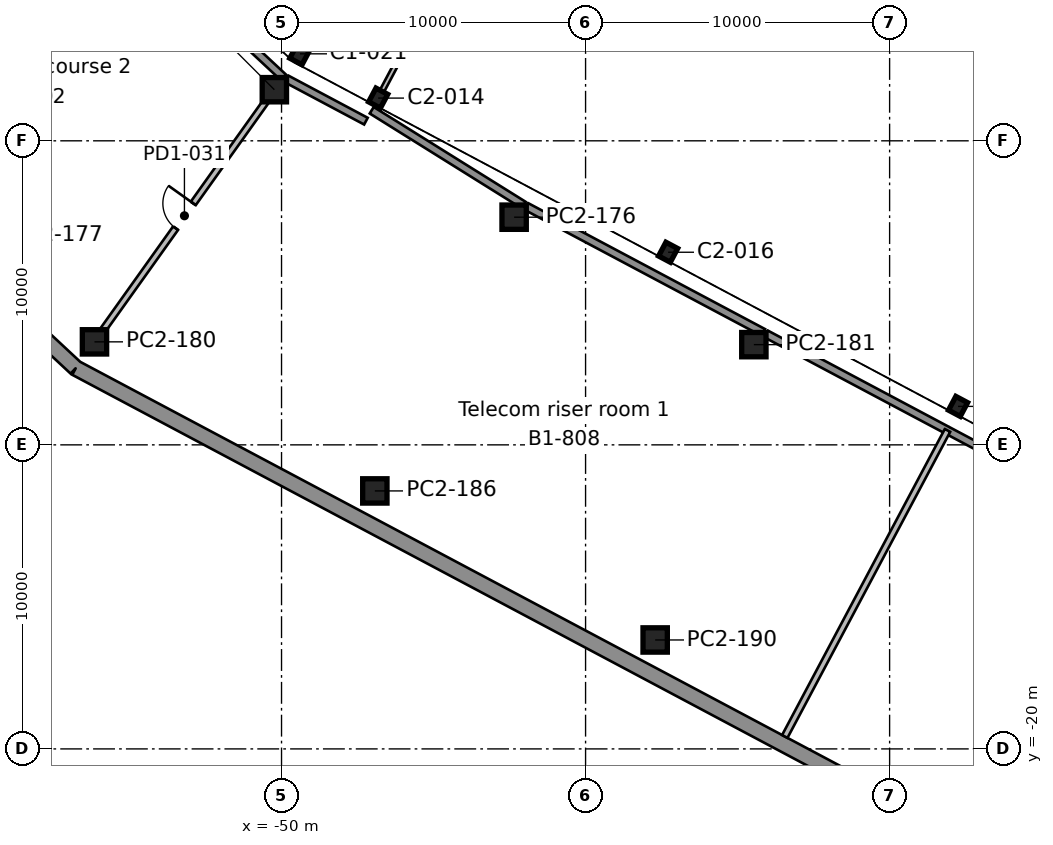
"""IFC4 building model, lengths in metres.
Left out: names, types, materials, properties, quantities, classifications, styles, units other than length and angle.
Written with IfcOpenShell. Run it as: python <this file> out.ifc"""

import sys

from ifc_helpers import new_model, si_unit, direction, frame, frame_2d, origin, origin_2d, place, context, subcontext, project, spatial, rectangle, i_section, extrude, element, fill, save


model = new_model("IFC4")
c1 = context("Model", 3, precision=1e-05, world=origin(), true_north=direction((0.0, 1.0)))
c2 = subcontext(c1, "Body", "Model", "MODEL_VIEW")
j1 = project(units=[si_unit("LENGTHUNIT", "METRE"), si_unit("PLANEANGLEUNIT", "RADIAN")], contexts=[c1])
p1 = place(None, origin())
s1 = spatial("IfcSite", under=j1, at=p1, CompositionType="ELEMENT")
p2 = place(p1, origin())
s2 = spatial("IfcBuilding", under=s1, at=p2, CompositionType="ELEMENT")
p3 = place(p2, frame((0.0, 0.0, -4.5)))
s3 = spatial("IfcBuildingStorey", under=s2, at=p3, CompositionType="ELEMENT", Elevation=-4.5)
for number, where, z_axis, x_axis in (
    (1, (-27.749, -8.735, 0.0), (0.0, 0.0, 1.0), (0.883, -0.469, 0.0)),
    (2, (-37.285, -3.665, 0.0), (0.0, 0.0, 1.0), (0.883, -0.469, 0.0)),
    (3, (-46.821, 1.405, 0.0), (0.0, 0.0, 1.0), (0.883, -0.469, 0.0)),
):
    element("IfcColumn", number, at=place(p3, frame(where, z_axis=z_axis, x_axis=x_axis)), inside=s3, PredefinedType="COLUMN", context=c2, shape_type="SweptSolid", body=[
        extrude(i_section(OverallWidth=0.437, OverallDepth=0.513, WebThickness=0.061, FlangeThickness=0.097, FilletRadius=0.015, at=origin_2d()), origin(), (0.0, 0.0, 1.0), 4.5),
    ])
p4 = place(p3, frame((-49.394, 2.861, 0.0), z_axis=(0.0, 0.0, 1.0), x_axis=(0.882947592859, -0.469471562786, 0.0)))
e4 = element("IfcColumn", 4, at=p4, inside=s3, PredefinedType="COLUMN", context=c2, shape_type="SweptSolid", body=[
    extrude(i_section(OverallWidth=0.455, OverallDepth=0.569, WebThickness=0.078, FlangeThickness=0.125, FilletRadius=0.015, at=origin_2d()), origin(), (0.0, 0.0, 1.0), 4.5),
])
p5 = place(p3, frame((-22.937, 1.38, 0.0), z_axis=(0.0, 0.0, 1.0), x_axis=(-0.88295276571, 0.46946183394, 0.0)))
e5 = element("IfcWall", 5, at=p5, inside=s3, PredefinedType="SHEAR", context=c2, shape_type="SweptSolid", body=[
    extrude(rectangle(XDim=20.2, YDim=0.9, at=frame_2d((10.1, 0.0))), origin(), (0.0, 0.0, 1.0), 4.5),
])
p6 = place(p3, frame((-68.297, 3.277, 0.0), z_axis=(0.0, 0.0, 1.0), x_axis=(0.73135285176, -0.681999271424, 0.0)))
e6 = element("IfcWall", 6, at=p6, inside=s3, PredefinedType="SOLIDWALL", context=c2, shape_type="SweptSolid", body=[
    extrude(rectangle(XDim=15.765, YDim=0.5, at=frame_2d((7.883, 0.0))), origin(), (0.0, 0.0, 1.0), 4.5),
])
p7 = place(p3, frame((-56.767, -7.475, 0.0), z_axis=(0.0, 0.0, 1.0), x_axis=(0.882947974138, -0.469470845703, 0.0)))
e7 = element("IfcWall", 7, at=p7, inside=s3, PredefinedType="SOLIDWALL", context=c2, shape_type="SweptSolid", body=[
    extrude(rectangle(XDim=57.833, YDim=0.5, at=frame_2d((28.917, 0.0))), origin(), (0.0, 0.0, 1.0), 4.5),
])
for number, where, z_axis, x_axis in (
    (8, (-37.711, -16.417, 0.0), (0.0, 0.0, 1.0), (1.0, 0.0, 0.0)),
    (9, (-46.931, -11.515, 0.0), (0.0, 0.0, 1.0), (1.0, 0.0, 0.0)),
    (10, (-34.465, -6.704, 0.0), (0.0, 0.0, 1.0), (1.0, 0.0, 0.0)),
    (11, (-56.152, -6.612, 0.0), (0.0, 0.0, 1.0), (1.0, 0.0, 0.0)),
    (12, (-42.35, -2.512, 0.0), (0.0, 0.0, 1.0), (1.0, 0.0, 0.0)),
    (13, (-50.236, 1.681, 0.0), (0.0, 0.0, 1.0), (1.0, 0.0, 0.0)),
):
    element("IfcColumn", number, at=place(p3, frame(where, z_axis=z_axis, x_axis=x_axis)), inside=s3, PredefinedType="COLUMN", context=c2, shape_type="SweptSolid", body=[
        extrude(rectangle(XDim=0.8, YDim=0.8, at=origin_2d()), origin(), (0.0, 0.0, 1.0), 4.05),
    ])
p8 = place(p3, frame((-33.448, -19.59, 0.0), z_axis=(0.0, 0.0, 1.0), x_axis=(0.469466279335, 0.882950402099, 0.0)))
e14 = element("IfcWall", 14, at=p8, inside=s3, PredefinedType="PARTITIONING", context=c2, shape_type="SweptSolid", body=[
    extrude(rectangle(XDim=11.4, YDim=0.2, at=frame_2d((5.7, 0.0))), origin(), (0.0, 0.0, 1.0), 4.05),
])
p9 = place(p3, frame((-47.224, 0.646, 0.0), z_axis=(0.0, 0.0, 1.0), x_axis=(-0.882766080441, 0.469812778905, 0.0)))
e15 = element("IfcWall", 15, at=p9, inside=s3, PredefinedType="SOLIDWALL", context=c2, shape_type="SweptSolid", body=[
    extrude(rectangle(XDim=2.958, YDim=0.25, at=frame_2d((1.479, 0.0))), origin(), (0.0, 0.0, 1.0), 4.05),
])
p10 = place(p3, frame((-28.092, -9.527, 0.0), z_axis=(0.0, 0.0, 1.0), x_axis=(-0.882951650701, 0.469463931016, 0.0)))
e16 = element("IfcWall", 16, at=p10, inside=s3, PredefinedType="SOLIDWALL", context=c2, shape_type="SweptSolid", body=[
    extrude(rectangle(XDim=6.765, YDim=0.25, at=frame_2d((3.382, 0.0))), origin(), (0.0, 0.0, 1.0), 4.05),
])
p11 = place(p3, frame((-34.153, -6.304, 0.0), z_axis=(0.0, 0.0, 1.0), x_axis=(-0.882943838539, 0.469478623567, 0.0)))
e17 = element("IfcWall", 17, at=p11, inside=s3, PredefinedType="SOLIDWALL", context=c2, shape_type="SweptSolid", body=[
    extrude(rectangle(XDim=8.831, YDim=0.25, at=frame_2d((4.415, 0.0))), origin(), (0.0, 0.0, 1.0), 4.05),
])
p12 = place(p3, frame((-42.037, -2.112, 0.0), z_axis=(0.0, 0.0, 1.0), x_axis=(-0.848449825707, 0.529275819642, 0.0)))
e18 = element("IfcWall", 18, at=p12, inside=s3, PredefinedType="SOLIDWALL", context=c2, shape_type="SweptSolid", body=[
    extrude(rectangle(XDim=5.889, YDim=0.25, at=frame_2d((2.945, 0.0))), origin(), (0.0, 0.0, 1.0), 4.05),
])
p13 = place(p3, frame((-50.521, 1.281, 0.0), z_axis=(0.0, 0.0, 1.0), x_axis=(-0.580708624763, -0.814111474631, 0.0)))
e19 = element("IfcWall", 19, at=p13, inside=s3, PredefinedType="PARTITIONING", context=c2, shape_type="SweptSolid", body=[
    extrude(rectangle(XDim=9.204, YDim=0.2, at=frame_2d((4.602, 0.0))), origin(), (0.0, 0.0, 1.0), 4.05),
])
p14 = place(p13, frame((4.102, 0.0, 0.0)))
e20 = element("IfcOpeningElement", 20, at=p14, cuts=e19, PredefinedType="OPENING", context=c2, shape_type="SweptSolid", body=[
    extrude(rectangle(XDim=1.0, YDim=2.1, at=frame_2d((0.5, 1.05))), frame((0.0, 0.11, 0.0), z_axis=(0.0, -1.0, 0.0), x_axis=(1.0, 0.0, 0.0)), (0.0, 0.0, 1.0), 0.22),
])
p15 = place(p3, frame((-26.267, -10.497, 0.0), z_axis=(0.0, 0.0, 1.0), x_axis=(-0.882964142915, 0.469440435335, 0.0)))
e21 = element("IfcWall", 21, at=p15, inside=s3, PredefinedType="SOLIDWALL", context=c2, shape_type="SweptSolid", body=[
    extrude(rectangle(XDim=2.065, YDim=0.25, at=frame_2d((1.033, 0.0))), origin(), (0.0, 0.0, 1.0), 4.05),
])
p16 = place(p3, frame((-46.7, 1.632, 0.0), z_axis=(0.0, 0.0, 1.0), x_axis=(0.46948131983, 0.882942404878, 0.0)))
e22 = element("IfcWall", 22, at=p16, inside=s3, PredefinedType="PARTITIONING", context=c2, shape_type="SweptSolid", body=[
    extrude(rectangle(XDim=9.688, YDim=0.15, at=frame_2d((4.844, 0.0))), origin(), (0.0, 0.0, 1.0), 4.05),
])
p17 = place(p3, frame((-53.972, 5.849, 0.0), z_axis=(0.0, 0.0, 1.0), x_axis=(0.731317536597, -0.682037140239, 0.0)))
e23 = element("IfcWall", 23, at=p17, inside=s3, PredefinedType="SOLIDWALL", context=c2, shape_type="SweptSolid", body=[
    extrude(rectangle(XDim=5.509, YDim=0.25, at=frame_2d((2.754, 0.0))), origin(), (0.0, 0.0, 1.0), 4.05),
])
p18 = place(p14, frame((1.0, 0.0, 0.0), z_axis=(0.0, 0.0, 1.0), x_axis=(-1.0, 0.0, 0.0)))
e24 = element("IfcDoor", 24, at=p18, inside=s3, OperationType="SINGLE_SWING_RIGHT", PredefinedType="DOOR", context=c2, shape_type="SweptSolid", body=[
    extrude(rectangle(XDim=1.0, YDim=2.1, at=frame_2d((0.5, 1.05))), frame((0.0, 0.025, 0.0), z_axis=(0.0, -1.0, 0.0), x_axis=(1.0, 0.0, 0.0)), (0.0, 0.0, 1.0), 0.05),
])
fill(e20, e24)
save(model, sys.argv[1])
